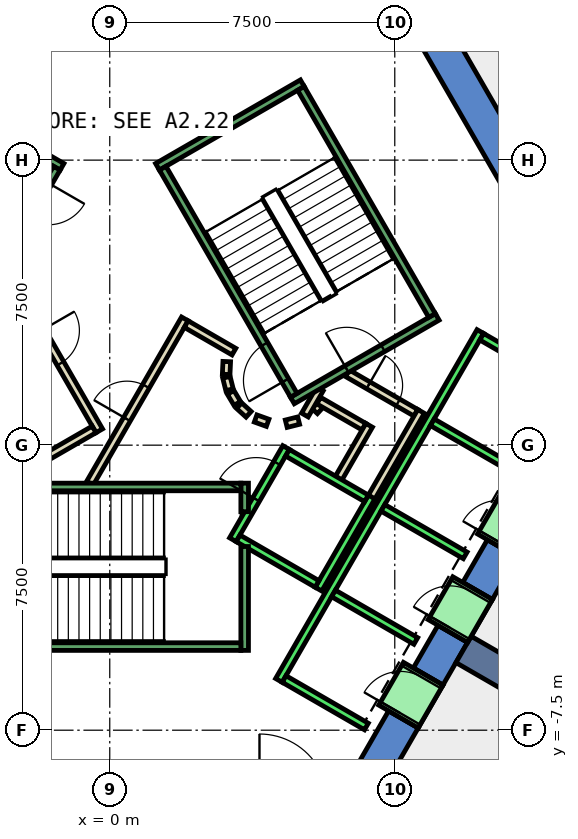
"""IFC4 building model, lengths in metres.
Left out: names, types, materials, properties, quantities, classifications, styles, units other than length and angle.
Written with IfcOpenShell. Run it as: python <this file> out.ifc"""

import sys

from ifc_helpers import new_model, si_unit, direction, frame, frame_2d, origin, place, context, subcontext, project, spatial, polyline, rectangle, outline, extrude, element, fill, save


model = new_model("IFC4")
c1 = context("Model", 3, precision=1e-05, world=origin(), true_north=direction((0.0, 1.0)))
c2 = subcontext(c1, "Body", "Model", "MODEL_VIEW")
j1 = project(units=[si_unit("LENGTHUNIT", "METRE"), si_unit("PLANEANGLEUNIT", "RADIAN")], contexts=[c1])
p1 = place(None, origin())
s1 = spatial("IfcSite", under=j1, at=p1, CompositionType="ELEMENT")
p2 = place(p1, origin())
s2 = spatial("IfcBuilding", under=s1, at=p2, CompositionType="ELEMENT")
p3 = place(p2, frame((0.0, 0.0, 103.4)))
s3 = spatial("IfcBuildingStorey", under=s2, at=p3, CompositionType="ELEMENT", Elevation=103.4)
p4 = place(p3, frame((0.0, 0.0, -0.4)))
e1 = element("IfcWall", 1, at=p4, inside=s3, PredefinedType="SHEAR", context=c2, shape_type="SweptSolid", body=[
    extrude(outline(polyline([(8.517, 11.748), (7.738, 11.298), (12.817, 2.5), (13.856, 2.5), (8.517, 11.748)])), origin(), (0.0, 0.0, 1.0), 4.2),
])
p5 = place(p3, frame((0.0, 0.0, -0.4)))
e2 = element("IfcWall", 2, at=p5, inside=s3, PredefinedType="SHEAR", context=c2, shape_type="SweptSolid", body=[
    extrude(outline(polyline([(8.117, -7.44), (7.338, -6.99), (6.409, -8.6), (6.928, -9.5), (8.117, -7.44)])), origin(), (0.0, 0.0, 1.0), 4.2),
])
p6 = place(p3, frame((0.0, 0.0, -0.4)))
e3 = element("IfcWall", 3, at=p6, inside=s3, PredefinedType="SHEAR", context=c2, shape_type="SweptSolid", body=[
    extrude(outline(polyline([(9.417, -5.189), (8.638, -4.739), (7.988, -5.864), (8.767, -6.314), (9.417, -5.189)])), origin(), (0.0, 0.0, 1.0), 4.2),
])
p7 = place(p3, frame((0.0, 0.0, -0.4)))
e4 = element("IfcWall", 4, at=p7, inside=s3, PredefinedType="SHEAR", context=c2, shape_type="SweptSolid", body=[
    extrude(outline(polyline([(10.717, -2.937), (9.938, -2.487), (9.288, -3.613), (10.067, -4.063), (10.717, -2.937)])), origin(), (0.0, 0.0, 1.0), 4.2),
])
p8 = place(p3, frame((0.0, 0.0, 3.6)))
e5 = element("IfcWall", 5, at=p8, inside=s3, PredefinedType="SHEAR", context=c2, shape_type="SweptSolid", body=[
    extrude(outline(polyline([(8.767, -6.314), (7.988, -5.864), (7.338, -6.99), (8.117, -7.44), (8.767, -6.314)])), origin(), (0.0, 0.0, 1.0), 0.2),
])
p9 = place(p3, frame((0.0, 0.0, 3.6)))
e6 = element("IfcWall", 6, at=p9, inside=s3, PredefinedType="SHEAR", context=c2, shape_type="SweptSolid", body=[
    extrude(outline(polyline([(10.067, -4.063), (9.288, -3.613), (8.638, -4.739), (9.417, -5.189), (10.067, -4.063)])), origin(), (0.0, 0.0, 1.0), 0.2),
])
p10 = place(p3, frame((0.0, 0.0, 3.6)))
e7 = element("IfcWall", 7, at=p10, inside=s3, PredefinedType="SHEAR", context=c2, shape_type="SweptSolid", body=[
    extrude(outline(polyline([(11.367, -1.811), (10.588, -1.361), (9.938, -2.487), (10.717, -2.937), (11.367, -1.811)])), origin(), (0.0, 0.0, 1.0), 0.2),
])
p11 = place(p3, frame((9.31, -5.375, -0.4), z_axis=(0.0, 0.0, 1.0), x_axis=(0.866017533419, -0.500013631625, 0.0)))
e8 = element("IfcWall", 8, at=p11, inside=s3, PredefinedType="SHEAR", context=c2, shape_type="SweptSolid", body=[
    extrude(rectangle(XDim=9.0, YDim=0.8, at=frame_2d((4.5, 0.0))), origin(), (0.0, 0.0, 1.0), 4.2),
])
p12 = place(p3, frame((5.39, 0.898, 0.0), z_axis=(0.0, 0.0, 1.0), x_axis=(0.673828488714, 0.738887791073, 0.0)))
e9 = element("IfcWall", 9, at=p12, inside=s3, PredefinedType="PARTITIONING", context=c2, shape_type="SweptSolid", body=[
    extrude(rectangle(XDim=0.263, YDim=0.2, at=frame_2d((0.131, 0.0))), origin(), (0.0, 0.0, 1.0), 3.8),
])
p13 = place(p3, frame((5.499, 1.172, 0.0), z_axis=(0.0, 0.0, 1.0), x_axis=(0.866333505267, -0.499465972466, 0.0)))
e10 = element("IfcWall", 10, at=p13, inside=s3, PredefinedType="PARTITIONING", context=c2, shape_type="SweptSolid", body=[
    extrude(rectangle(XDim=1.374, YDim=0.2, at=frame_2d((0.687, 0.0))), origin(), (0.0, 0.0, 1.0), 3.8),
])
p14 = place(p3, frame((6.826, 0.522, 0.0), z_axis=(0.0, 0.0, 1.0), x_axis=(-0.500016722714, -0.866015748706, 0.0)))
e11 = element("IfcWall", 11, at=p14, inside=s3, PredefinedType="PARTITIONING", context=c2, shape_type="SweptSolid", body=[
    extrude(rectangle(XDim=1.7, YDim=0.2, at=frame_2d((0.85, 0.0))), origin(), (0.0, 0.0, 1.0), 3.8),
])
p15 = place(p3, frame((6.25, 1.894, 0.0), z_axis=(0.0, 0.0, 1.0), x_axis=(0.866043184279, -0.499969202016, 0.0)))
e12 = element("IfcWall", 12, at=p15, inside=s3, PredefinedType="PARTITIONING", context=c2, shape_type="SweptSolid", body=[
    extrude(rectangle(XDim=2.084, YDim=0.2, at=frame_2d((1.042, 0.0))), origin(), (0.0, 0.0, 1.0), 3.8),
])
p16 = place(p15, frame((0.642, 0.0, 0.0)))
e13 = element("IfcOpeningElement", 13, at=p16, cuts=e12, PredefinedType="OPENING", context=c2, shape_type="SweptSolid", body=[
    extrude(rectangle(XDim=0.9, YDim=2.1, at=frame_2d((0.45, 1.05))), frame((0.0, 0.11, 0.0), z_axis=(0.0, -1.0, 0.0), x_axis=(1.0, 0.0, 0.0)), (0.0, 0.0, 1.0), 0.22),
])
p17 = place(p3, frame((8.192, 0.888, 0.0), z_axis=(0.0, 0.0, 1.0), x_axis=(-0.499940625693, -0.866059680843, 0.0)))
e14 = element("IfcWall", 14, at=p17, inside=s3, PredefinedType="PARTITIONING", context=c2, shape_type="SweptSolid", body=[
    extrude(rectangle(XDim=2.68, YDim=0.2, at=frame_2d((1.34, 0.0))), origin(), (0.0, 0.0, 1.0), 3.8),
])
p18 = place(p3, frame((5.135, 0.793, 0.0), z_axis=(0.0, 0.0, 1.0), x_axis=(0.499526442893, 0.866298639529, 0.0)))
e15 = element("IfcWall", 15, at=p18, inside=s3, PredefinedType="PARTITIONING", context=c2, shape_type="SweptSolid", body=[
    extrude(rectangle(XDim=0.791, YDim=0.2, at=frame_2d((0.396, 0.0))), origin(), (0.0, 0.0, 1.0), 3.8),
])
p19 = place(p3, frame((-0.52, -1.0, 0.0), z_axis=(0.0, 0.0, 1.0), x_axis=(0.50011622646, 0.865958290007, 0.0)))
e16 = element("IfcWall", 16, at=p19, inside=s3, PredefinedType="PARTITIONING", context=c2, shape_type="SweptSolid", body=[
    extrude(rectangle(XDim=4.991, YDim=0.2, at=frame_2d((2.496, 0.0))), origin(), (0.0, 0.0, 1.0), 3.8),
])
p20 = place(p19, frame((1.945, 0.0, 0.0)))
e17 = element("IfcOpeningElement", 17, at=p20, cuts=e16, PredefinedType="OPENING", context=c2, shape_type="SweptSolid", body=[
    extrude(rectangle(XDim=1.0, YDim=2.1, at=frame_2d((0.5, 1.05))), frame((0.0, 0.11, 0.0), z_axis=(0.0, -1.0, 0.0), x_axis=(1.0, 0.0, 0.0)), (0.0, 0.0, 1.0), 0.22),
])
p21 = place(p3, frame((2.012, 3.186, 0.0), z_axis=(0.0, 0.0, 1.0), x_axis=(0.865891012941, -0.500232699559, 0.0)))
e18 = element("IfcWall", 18, at=p21, inside=s3, PredefinedType="PARTITIONING", context=c2, shape_type="SweptSolid", body=[
    extrude(rectangle(XDim=1.449, YDim=0.2, at=frame_2d((0.725, 0.0))), origin(), (0.0, 0.0, 1.0), 3.8),
])
p22 = place(p3, frame((3.079, 2.199, 0.0), z_axis=(0.0, 0.0, 1.0), x_axis=(-0.047771483479, -0.998858290933, 0.0)))
e19 = element("IfcWall", 19, at=p22, inside=s3, PredefinedType="PARTITIONING", context=c2, shape_type="SweptSolid", body=[
    extrude(rectangle(XDim=0.337, YDim=0.2, at=frame_2d((0.169, 0.0))), origin(), (0.0, 0.0, 1.0), 3.8),
])
p23 = place(p3, frame((3.07, 1.786, 0.0), z_axis=(0.0, 0.0, 1.0), x_axis=(0.242705583207, -0.970099994784, 0.0)))
e20 = element("IfcWall", 20, at=p23, inside=s3, PredefinedType="PARTITIONING", context=c2, shape_type="SweptSolid", body=[
    extrude(rectangle(XDim=0.338, YDim=0.2, at=frame_2d((0.169, 0.0))), origin(), (0.0, 0.0, 1.0), 3.8),
])
for number, where, z_axis, x_axis in (
    (21, (3.182, 1.388, 0.0), (0.0, 0.0, 1.0), (0.512, -0.859, 0.0)),
    (22, (3.404, 1.039, 0.0), (0.0, 0.0, 1.0), (0.74, -0.672, 0.0)),
):
    element("IfcWall", number, at=place(p3, frame(where, z_axis=z_axis, x_axis=x_axis)), inside=s3, PredefinedType="PARTITIONING", context=c2, shape_type="SweptSolid", body=[
        extrude(rectangle(XDim=0.338, YDim=0.2, at=frame_2d((0.169, 0.0))), origin(), (0.0, 0.0, 1.0), 3.8),
    ])
p24 = place(p3, frame((3.838, 0.702, 0.0), z_axis=(0.0, 0.0, 1.0), x_axis=(0.941035081519, -0.338308993895, 0.0)))
e23 = element("IfcWall", 23, at=p24, inside=s3, PredefinedType="PARTITIONING", context=c2, shape_type="SweptSolid", body=[
    extrude(rectangle(XDim=0.337, YDim=0.2, at=frame_2d((0.168, 0.0))), origin(), (0.0, 0.0, 1.0), 3.8),
])
p25 = place(p3, frame((4.644, 0.564, 0.0), z_axis=(0.0, 0.0, 1.0), x_axis=(0.969929076366, 0.243387729394, 0.0)))
e24 = element("IfcWall", 24, at=p25, inside=s3, PredefinedType="PARTITIONING", context=c2, shape_type="SweptSolid", body=[
    extrude(rectangle(XDim=0.337, YDim=0.2, at=frame_2d((0.168, 0.0))), origin(), (0.0, 0.0, 1.0), 3.8),
])
p26 = place(p3, frame((-2.771, 4.7, 0.0), z_axis=(0.0, 0.0, 1.0), x_axis=(0.499969479948, -0.866043023828, 0.0)))
e25 = element("IfcWall", 25, at=p26, inside=s3, PredefinedType="PARTITIONING", context=c2, shape_type="SweptSolid", body=[
    extrude(rectangle(XDim=4.99, YDim=0.2, at=frame_2d((2.495, 0.0))), origin(), (0.0, 0.0, 1.0), 3.8),
])
p27 = place(p26, frame((1.945, 0.0, 0.0)))
e26 = element("IfcOpeningElement", 26, at=p27, cuts=e25, PredefinedType="OPENING", context=c2, shape_type="SweptSolid", body=[
    extrude(rectangle(XDim=1.0, YDim=2.1, at=frame_2d((0.5, 1.05))), frame((0.0, 0.11, 0.0), z_axis=(0.0, -1.0, 0.0), x_axis=(1.0, 0.0, 0.0)), (0.0, 0.0, 1.0), 0.22),
])
p28 = place(p3, frame((-0.412, 0.414, 0.0), z_axis=(0.0, 0.0, 1.0), x_axis=(-0.866017369001, -0.500013916395, 0.0)))
e27 = element("IfcWall", 27, at=p28, inside=s3, PredefinedType="PARTITIONING", context=c2, shape_type="SweptSolid", body=[
    extrude(rectangle(XDim=1.45, YDim=0.2, at=frame_2d((0.725, 0.0))), origin(), (0.0, 0.0, 1.0), 3.8),
])
p29 = place(p3, frame((12.401, -7.621, 0.0), z_axis=(0.0, 0.0, 1.0), x_axis=(-0.499983724212, -0.866034800411, 0.0)))
e28 = element("IfcWall", 28, at=p29, inside=s3, PredefinedType="PARTITIONING", context=c2, shape_type="SweptSolid", body=[
    extrude(rectangle(XDim=9.302, YDim=0.2, at=frame_2d((4.651, 0.0))), origin(), (0.0, 0.0, 1.0), 3.8),
])
p30 = place(p3, frame((3.24, -2.488, 0.0), z_axis=(0.0, 0.0, 1.0), x_axis=(0.49994636267, 0.866056369097, 0.0)))
e29 = element("IfcWall", 29, at=p30, inside=s3, PredefinedType="STANDARD", context=c2, shape_type="SweptSolid", body=[
    extrude(rectangle(XDim=2.8, YDim=0.2, at=frame_2d((1.4, 0.0))), origin(), (0.0, 0.0, 1.0), 3.8),
])
p31 = place(p30, frame((1.225, 0.0, 0.0)))
e30 = element("IfcOpeningElement", 30, at=p31, cuts=e29, PredefinedType="OPENING", context=c2, shape_type="SweptSolid", body=[
    extrude(rectangle(XDim=1.1, YDim=2.1, at=frame_2d((0.55, 1.05))), frame((0.0, 0.11, 0.0), z_axis=(0.0, -1.0, 0.0), x_axis=(1.0, 0.0, 0.0)), (0.0, 0.0, 1.0), 0.22),
])
p32 = place(p3, frame((5.492, -3.788, 0.0), z_axis=(0.0, 0.0, 1.0), x_axis=(0.500011755427, 0.866018616679, 0.0)))
e31 = element("IfcWall", 31, at=p32, inside=s3, PredefinedType="STANDARD", context=c2, shape_type="SweptSolid", body=[
    extrude(rectangle(XDim=2.8, YDim=0.2, at=frame_2d((1.4, 0.0))), origin(), (0.0, 0.0, 1.0), 3.8),
])
p33 = place(p3, frame((3.377, -2.452, 0.0), z_axis=(0.0, 0.0, 1.0), x_axis=(0.865955154139, -0.50012165622, 0.0)))
e32 = element("IfcWall", 32, at=p33, inside=s3, PredefinedType="STANDARD", context=c2, shape_type="SweptSolid", body=[
    extrude(rectangle(XDim=2.4, YDim=0.2, at=frame_2d((1.2, 0.0))), origin(), (0.0, 0.0, 1.0), 3.8),
])
p34 = place(p3, frame((4.677, -0.2, 0.0), z_axis=(0.0, 0.0, 1.0), x_axis=(0.865973769406, -0.500089422704, 0.0)))
e33 = element("IfcWall", 33, at=p34, inside=s3, PredefinedType="STANDARD", context=c2, shape_type="SweptSolid", body=[
    extrude(rectangle(XDim=2.399, YDim=0.2, at=frame_2d((1.2, 0.0))), origin(), (0.0, 0.0, 1.0), 3.8),
])
p35 = place(p3, frame((4.451, -6.19, 0.0), z_axis=(0.0, 0.0, 1.0), x_axis=(0.50000090737, 0.866024879913, 0.0)))
e34 = element("IfcWall", 34, at=p35, inside=s3, PredefinedType="STANDARD", context=c2, shape_type="SweptSolid", body=[
    extrude(rectangle(XDim=10.6, YDim=0.2, at=frame_2d((5.3, 0.0))), origin(), (0.0, 0.0, 1.0), 3.8),
])
for number, where, z_axis, x_axis in (
    (35, (4.588, -6.153, 0.0), (0.0, 0.0, 1.0), (0.866, -0.5, 0.0)),
    (36, (5.888, -3.902, 0.0), (0.0, 0.0, 1.0), (0.866, -0.5, 0.0)),
    (37, (7.188, -1.65, 0.0), (0.0, 0.0, 1.0), (0.866, -0.5, 0.0)),
    (38, (8.488, 0.602, 0.0), (0.0, 0.0, 1.0), (0.866, -0.5, 0.0)),
):
    element("IfcWall", number, at=place(p3, frame(where, z_axis=z_axis, x_axis=x_axis)), inside=s3, PredefinedType="STANDARD", context=c2, shape_type="SweptSolid", body=[
        extrude(rectangle(XDim=2.5, YDim=0.2, at=frame_2d((1.25, 0.0))), origin(), (0.0, 0.0, 1.0), 3.8),
    ])
p36 = place(p3, frame((9.788, 2.853, 0.0), z_axis=(0.0, 0.0, 1.0), x_axis=(0.865998541277, -0.500046524342, 0.0)))
e39 = element("IfcWall", 39, at=p36, inside=s3, PredefinedType="STANDARD", context=c2, shape_type="SweptSolid", body=[
    extrude(rectangle(XDim=2.5, YDim=0.2, at=frame_2d((1.25, 0.0))), origin(), (0.0, 0.0, 1.0), 3.8),
])
p37 = place(p3, frame((7.598, -7.14, 0.0), z_axis=(0.0, 0.0, 1.0), x_axis=(0.500362116554, 0.865816234728, 0.0)))
e40 = element("IfcWall", 40, at=p37, inside=s3, PredefinedType="STANDARD", context=c2, shape_type="SweptSolid", body=[
    extrude(rectangle(XDim=1.299, YDim=1.2, at=frame_2d((0.65, 0.0))), origin(), (0.0, 0.0, 1.0), 2.4),
])
p38 = place(p37, frame((0.1, 0.0, 0.0)))
e41 = element("IfcOpeningElement", 41, at=p38, cuts=e40, PredefinedType="OPENING", context=c2, shape_type="SweptSolid", body=[
    extrude(rectangle(XDim=1.1, YDim=2.3, at=frame_2d((0.55, 1.15))), frame((0.0, 0.61, 0.0), z_axis=(0.0, -1.0, 0.0), x_axis=(1.0, 0.0, 0.0)), (0.0, 0.0, 1.0), 1.22),
])
p39 = place(p3, frame((8.898, -4.889, 0.0), z_axis=(0.0, 0.0, 1.0), x_axis=(0.500036693733, 0.866004217611, 0.0)))
e42 = element("IfcWall", 42, at=p39, inside=s3, PredefinedType="STANDARD", context=c2, shape_type="SweptSolid", body=[
    extrude(rectangle(XDim=1.3, YDim=1.2, at=frame_2d((0.65, 0.0))), origin(), (0.0, 0.0, 1.0), 2.4),
])
p40 = place(p39, frame((0.1, 0.0, 0.0)))
e43 = element("IfcOpeningElement", 43, at=p40, cuts=e42, PredefinedType="OPENING", context=c2, shape_type="SweptSolid", body=[
    extrude(rectangle(XDim=1.1, YDim=2.3, at=frame_2d((0.55, 1.15))), frame((0.0, 0.61, 0.0), z_axis=(0.0, -1.0, 0.0), x_axis=(1.0, 0.0, 0.0)), (0.0, 0.0, 1.0), 1.22),
])
p41 = place(p3, frame((10.198, -2.637, 0.0), z_axis=(0.0, 0.0, 1.0), x_axis=(0.49989585183, 0.866085525409, 0.0)))
e44 = element("IfcWall", 44, at=p41, inside=s3, PredefinedType="STANDARD", context=c2, shape_type="SweptSolid", body=[
    extrude(rectangle(XDim=1.3, YDim=1.2, at=frame_2d((0.65, 0.0))), origin(), (0.0, 0.0, 1.0), 2.4),
])
p42 = place(p41, frame((0.1, 0.0, 0.0)))
e45 = element("IfcOpeningElement", 45, at=p42, cuts=e44, PredefinedType="OPENING", context=c2, shape_type="SweptSolid", body=[
    extrude(rectangle(XDim=1.1, YDim=2.3, at=frame_2d((0.55, 1.15))), frame((0.0, 0.61, 0.0), z_axis=(0.0, -1.0, 0.0), x_axis=(1.0, 0.0, 0.0)), (0.0, 0.0, 1.0), 1.22),
])
p43 = place(p3, frame((3.55, -2.667, 0.0), z_axis=(0.0, 0.0, 1.0), x_axis=(0.0, -1.0, 0.0)))
e46 = element("IfcWall", 46, at=p43, inside=s3, PredefinedType="STANDARD", context=c2, shape_type="SweptSolid", body=[
    extrude(rectangle(XDim=2.733, YDim=0.2, at=frame_2d((1.366, 0.0))), origin(), (0.0, 0.0, 1.0), 3.8),
])
p44 = place(p3, frame((3.55, -1.0, 0.0), z_axis=(0.0, 0.0, 1.0), x_axis=(0.0, -1.0, 0.0)))
e47 = element("IfcWall", 47, at=p44, inside=s3, PredefinedType="STANDARD", context=c2, shape_type="SweptSolid", body=[
    extrude(rectangle(XDim=0.751, YDim=0.2, at=frame_2d((0.375, 0.0))), origin(), (0.0, 0.0, 1.0), 3.8),
])
p45 = place(p3, frame((-3.45, -1.1, 0.0), z_axis=(0.0, 0.0, 1.0), x_axis=(1.0, 0.0, 0.0)))
e48 = element("IfcWall", 48, at=p45, inside=s3, PredefinedType="STANDARD", context=c2, shape_type="SweptSolid", body=[
    extrude(rectangle(XDim=6.9, YDim=0.2, at=frame_2d((3.45, 0.0))), origin(), (0.0, 0.0, 1.0), 3.8),
])
p46 = place(p45, frame((0.45, 0.0, 0.0)))
e49 = element("IfcOpeningElement", 49, at=p46, cuts=e48, PredefinedType="OPENING", context=c2, shape_type="SweptSolid", body=[
    extrude(rectangle(XDim=1.1, YDim=2.2, at=frame_2d((0.55, 1.1))), frame((0.0, 0.11, 0.0), z_axis=(0.0, -1.0, 0.0), x_axis=(1.0, 0.0, 0.0)), (0.0, 0.0, 1.0), 0.22),
])
p47 = place(p3, frame((-3.45, -5.3, 0.0), z_axis=(0.0, 0.0, 1.0), x_axis=(1.0, 0.0, 0.0)))
e50 = element("IfcWall", 50, at=p47, inside=s3, PredefinedType="STANDARD", context=c2, shape_type="SweptSolid", body=[
    extrude(rectangle(XDim=6.9, YDim=0.2, at=frame_2d((3.45, 0.0))), origin(), (0.0, 0.0, 1.0), 3.8),
])
p48 = place(p3, frame((4.806, 1.176, 0.0), z_axis=(0.0, 0.0, 1.0), x_axis=(0.866059941101, 0.499940174841, 0.0)))
e51 = element("IfcWall", 51, at=p48, inside=s3, PredefinedType="STANDARD", context=c2, shape_type="SweptSolid", body=[
    extrude(rectangle(XDim=4.4, YDim=0.2, at=frame_2d((2.2, 0.0))), origin(), (0.0, 0.0, 1.0), 3.8),
])
p49 = place(p48, frame((1.65, 0.0, 0.0)))
e52 = element("IfcOpeningElement", 52, at=p49, cuts=e51, PredefinedType="OPENING", context=c2, shape_type="SweptSolid", body=[
    extrude(rectangle(XDim=1.1, YDim=2.2, at=frame_2d((0.55, 1.1))), frame((0.0, 0.11, 0.0), z_axis=(0.0, -1.0, 0.0), x_axis=(1.0, 0.0, 0.0)), (0.0, 0.0, 1.0), 0.22),
])
p50 = place(p3, frame((1.256, 7.324, 0.0), z_axis=(0.0, 0.0, 1.0), x_axis=(0.866046073146, 0.499964197906, 0.0)))
e53 = element("IfcWall", 53, at=p50, inside=s3, PredefinedType="STANDARD", context=c2, shape_type="SweptSolid", body=[
    extrude(rectangle(XDim=4.4, YDim=0.2, at=frame_2d((2.2, 0.0))), origin(), (0.0, 0.0, 1.0), 3.8),
])
p51 = place(p3, frame((4.843, 1.312, 0.0), z_axis=(0.0, 0.0, 1.0), x_axis=(-0.499963383562, 0.866046543262, 0.0)))
e54 = element("IfcWall", 54, at=p51, inside=s3, PredefinedType="STANDARD", context=c2, shape_type="SweptSolid", body=[
    extrude(rectangle(XDim=6.9, YDim=0.2, at=frame_2d((3.45, 0.0))), origin(), (0.0, 0.0, 1.0), 3.8),
])
p52 = place(p51, frame((0.45, 0.0, 0.0)))
e55 = element("IfcOpeningElement", 55, at=p52, cuts=e54, PredefinedType="OPENING", context=c2, shape_type="SweptSolid", body=[
    extrude(rectangle(XDim=1.1, YDim=2.2, at=frame_2d((0.55, 1.1))), frame((0.0, 0.11, 0.0), z_axis=(0.0, -1.0, 0.0), x_axis=(1.0, 0.0, 0.0)), (0.0, 0.0, 1.0), 0.22),
])
p53 = place(p3, frame((8.48, 3.412, 0.0), z_axis=(0.0, 0.0, 1.0), x_axis=(-0.499978703459, 0.866037698999, 0.0)))
e56 = element("IfcWall", 56, at=p53, inside=s3, PredefinedType="STANDARD", context=c2, shape_type="SweptSolid", body=[
    extrude(rectangle(XDim=6.9, YDim=0.2, at=frame_2d((3.45, 0.0))), origin(), (0.0, 0.0, 1.0), 3.8),
])
p54 = place(p3, frame((-1.256, 7.324, 0.0), z_axis=(0.0, 0.0, 1.0), x_axis=(-0.866046073146, 0.499964197906, 0.0)))
e57 = element("IfcWall", 57, at=p54, inside=s3, PredefinedType="STANDARD", context=c2, shape_type="SweptSolid", body=[
    extrude(rectangle(XDim=4.4, YDim=0.2, at=frame_2d((2.2, 0.0))), origin(), (0.0, 0.0, 1.0), 3.8),
])
p55 = place(p54, frame((1.65, 0.0, 0.0)))
e58 = element("IfcOpeningElement", 58, at=p55, cuts=e57, PredefinedType="OPENING", context=c2, shape_type="SweptSolid", body=[
    extrude(rectangle(XDim=1.1, YDim=2.2, at=frame_2d((0.55, 1.1))), frame((0.0, 0.11, 0.0), z_axis=(0.0, -1.0, 0.0), x_axis=(1.0, 0.0, 0.0)), (0.0, 0.0, 1.0), 0.22),
])
p56 = place(p3, frame((-1.393, 7.288, 0.0), z_axis=(0.0, 0.0, 1.0), x_axis=(-0.499963383562, -0.866046543262, 0.0)))
e59 = element("IfcWall", 59, at=p56, inside=s3, PredefinedType="STANDARD", context=c2, shape_type="SweptSolid", body=[
    extrude(rectangle(XDim=6.9, YDim=0.2, at=frame_2d((3.45, 0.0))), origin(), (0.0, 0.0, 1.0), 3.8),
])
p57 = place(p56, frame((0.45, 0.0, 0.0)))
e60 = element("IfcOpeningElement", 60, at=p57, cuts=e59, PredefinedType="OPENING", context=c2, shape_type="SweptSolid", body=[
    extrude(rectangle(XDim=1.1, YDim=2.2, at=frame_2d((0.55, 1.1))), frame((0.0, 0.11, 0.0), z_axis=(0.0, -1.0, 0.0), x_axis=(1.0, 0.0, 0.0)), (0.0, 0.0, 1.0), 0.22),
])
p58 = place(p20, origin())
e61 = element("IfcDoor", 61, at=p58, inside=s3, OperationType="SINGLE_SWING_LEFT", PredefinedType="DOOR", context=c2, shape_type="SweptSolid", body=[
    extrude(rectangle(XDim=1.0, YDim=2.1, at=frame_2d((0.5, 1.05))), frame((0.0, 0.025, 0.0), z_axis=(0.0, -1.0, 0.0), x_axis=(1.0, 0.0, 0.0)), (0.0, 0.0, 1.0), 0.05),
])
fill(e17, e61)
p59 = place(p27, origin())
e62 = element("IfcDoor", 62, at=p59, inside=s3, OperationType="SINGLE_SWING_RIGHT", PredefinedType="DOOR", context=c2, shape_type="SweptSolid", body=[
    extrude(rectangle(XDim=1.0, YDim=2.1, at=frame_2d((0.5, 1.05))), frame((0.0, 0.025, 0.0), z_axis=(0.0, -1.0, 0.0), x_axis=(1.0, 0.0, 0.0)), (0.0, 0.0, 1.0), 0.05),
])
fill(e26, e62)
p60 = place(p16, origin())
e63 = element("IfcDoor", 63, at=p60, inside=s3, OperationType="SINGLE_SWING_LEFT", PredefinedType="DOOR", context=c2, shape_type="SweptSolid", body=[
    extrude(rectangle(XDim=0.9, YDim=2.1, at=frame_2d((0.45, 1.05))), frame((0.0, 0.025, 0.0), z_axis=(0.0, -1.0, 0.0), x_axis=(1.0, 0.0, 0.0)), (0.0, 0.0, 1.0), 0.05),
])
fill(e13, e63)
p61 = place(p38, origin())
e64 = element("IfcDoor", 64, at=p61, inside=s3, OperationType="SLIDING_TO_LEFT", PredefinedType="DOOR", context=c2, shape_type="SweptSolid", body=[
    extrude(rectangle(XDim=1.1, YDim=2.3, at=frame_2d((0.55, 1.15))), frame((0.0, 0.025, 0.0), z_axis=(0.0, -1.0, 0.0), x_axis=(1.0, 0.0, 0.0)), (0.0, 0.0, 1.0), 0.05),
])
fill(e41, e64)
p62 = place(p40, origin())
e65 = element("IfcDoor", 65, at=p62, inside=s3, OperationType="SLIDING_TO_LEFT", PredefinedType="DOOR", context=c2, shape_type="SweptSolid", body=[
    extrude(rectangle(XDim=1.1, YDim=2.3, at=frame_2d((0.55, 1.15))), frame((0.0, 0.025, 0.0), z_axis=(0.0, -1.0, 0.0), x_axis=(1.0, 0.0, 0.0)), (0.0, 0.0, 1.0), 0.05),
])
fill(e43, e65)
p63 = place(p31, origin())
e66 = element("IfcDoor", 66, at=p63, inside=s3, OperationType="SLIDING_TO_LEFT", PredefinedType="DOOR", context=c2, shape_type="SweptSolid", body=[
    extrude(rectangle(XDim=1.1, YDim=2.1, at=frame_2d((0.55, 1.05))), frame((0.0, 0.025, 0.0), z_axis=(0.0, -1.0, 0.0), x_axis=(1.0, 0.0, 0.0)), (0.0, 0.0, 1.0), 0.05),
])
fill(e30, e66)
p64 = place(p52, origin())
e67 = element("IfcDoor", 67, at=p64, inside=s3, OperationType="SINGLE_SWING_LEFT", PredefinedType="DOOR", context=c2, shape_type="SweptSolid", body=[
    extrude(rectangle(XDim=1.1, YDim=2.2, at=frame_2d((0.55, 1.1))), frame((0.0, 0.025, 0.0), z_axis=(0.0, -1.0, 0.0), x_axis=(1.0, 0.0, 0.0)), (0.0, 0.0, 1.0), 0.05),
])
fill(e55, e67)
p65 = place(p49, origin())
e68 = element("IfcDoor", 68, at=p65, inside=s3, OperationType="SINGLE_SWING_LEFT", PredefinedType="DOOR", context=c2, shape_type="SweptSolid", body=[
    extrude(rectangle(XDim=1.1, YDim=2.2, at=frame_2d((0.55, 1.1))), frame((0.0, 0.025, 0.0), z_axis=(0.0, -1.0, 0.0), x_axis=(1.0, 0.0, 0.0)), (0.0, 0.0, 1.0), 0.05),
])
fill(e52, e68)
save(model, sys.argv[1])
